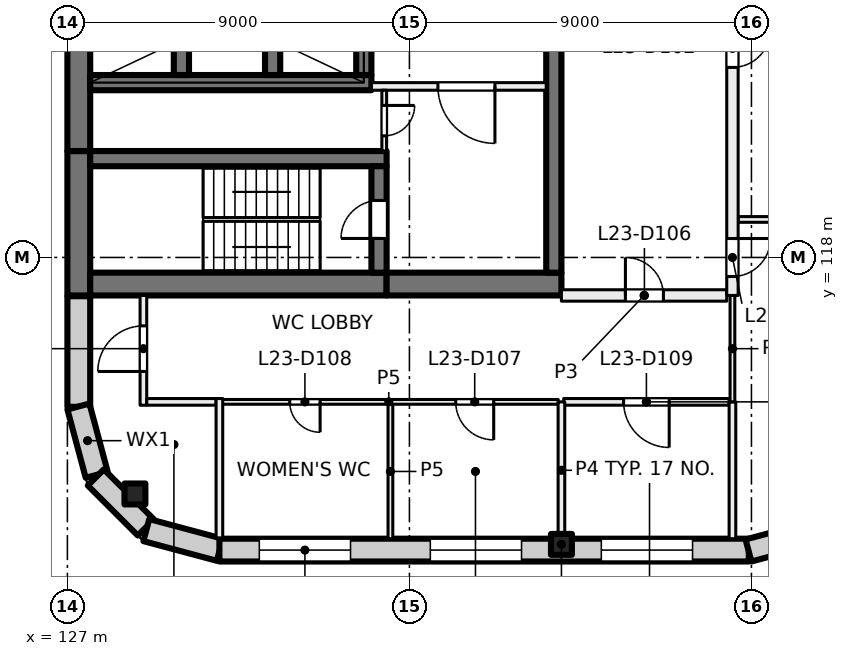
"""IFC4 building model, lengths in metres.
Left out: names, types, materials, properties, quantities, classifications, styles, units other than length and angle.
Written with IfcOpenShell. Run it as: python <this file> out.ifc"""

import sys

from ifc_helpers import new_model, si_unit, direction, frame, frame_2d, origin, origin_2d, place, context, subcontext, project, spatial, rectangle, extrude, element, fill, save


model = new_model("IFC4")
c1 = context("Model", 3, precision=1e-05, world=origin(), true_north=direction((0.0, 1.0)))
c2 = subcontext(c1, "Body", "Model", "MODEL_VIEW")
j1 = project(units=[si_unit("LENGTHUNIT", "METRE"), si_unit("PLANEANGLEUNIT", "RADIAN")], contexts=[c1])
p1 = place(None, origin())
s1 = spatial("IfcSite", under=j1, at=p1, CompositionType="ELEMENT")
p2 = place(p1, origin())
s2 = spatial("IfcBuilding", under=s1, at=p2, CompositionType="ELEMENT")
p3 = place(p2, frame((0.0, 0.0, 101.0)))
s3 = spatial("IfcBuildingStorey", under=s2, at=p3, CompositionType="ELEMENT", Elevation=101.0)
for number, where, z_axis, x_axis in (
    (1, (128.777, 111.777, 0.0), (0.0, 0.0, 1.0), (1.0, 0.0, 0.0)),
    (2, (140.0, 110.45, 0.0), (0.0, 0.0, 1.0), (1.0, 0.0, 0.0)),
):
    element("IfcColumn", number, at=place(p3, frame(where, z_axis=z_axis, x_axis=x_axis)), inside=s3, PredefinedType="COLUMN", context=c2, shape_type="SweptSolid", body=[
        extrude(rectangle(XDim=0.55, YDim=0.55, at=origin_2d()), origin(), (0.0, 0.0, 1.0), 4.0),
    ])
p4 = place(p3, frame((127.3, 117.0, 0.0), z_axis=(0.0, 0.0, 1.0), x_axis=(0.0, 1.0, 0.0)))
e3 = element("IfcWall", 3, at=p4, inside=s3, PredefinedType="SHEAR", context=c2, shape_type="SweptSolid", body=[
    extrude(rectangle(XDim=3.8, YDim=0.6, at=frame_2d((1.9, 0.0))), origin(), (0.0, 0.0, 1.0), 4.0),
])
p5 = place(p3, frame((127.3, 120.8, 0.0), z_axis=(0.0, 0.0, 1.0), x_axis=(0.0, 1.0, 0.0)))
e4 = element("IfcWall", 4, at=p5, inside=s3, PredefinedType="SHEAR", context=c2, shape_type="SweptSolid", body=[
    extrude(rectangle(XDim=14.4, YDim=0.6, at=frame_2d((7.2, 0.0))), origin(), (0.0, 0.0, 1.0), 4.0),
])
p6 = place(p3, frame((127.6, 117.3, 0.0), z_axis=(0.0, 0.0, 1.0), x_axis=(1.0, 0.0, 0.0)))
e5 = element("IfcWall", 5, at=p6, inside=s3, PredefinedType="SHEAR", context=c2, shape_type="SweptSolid", body=[
    extrude(rectangle(XDim=7.8, YDim=0.6, at=frame_2d((3.9, 0.0))), origin(), (0.0, 0.0, 1.0), 4.0),
])
p7 = place(p3, frame((135.4, 117.3, 0.0), z_axis=(0.0, 0.0, 1.0), x_axis=(1.0, 0.0, 0.0)))
e6 = element("IfcWall", 6, at=p7, inside=s3, PredefinedType="SHEAR", context=c2, shape_type="SweptSolid", body=[
    extrude(rectangle(XDim=4.6, YDim=0.6, at=frame_2d((2.3, 0.0))), origin(), (0.0, 0.0, 1.0), 4.0),
])
p8 = place(p3, frame((127.6, 120.6, 0.0), z_axis=(0.0, 0.0, 1.0), x_axis=(1.0, 0.0, 0.0)))
e7 = element("IfcWall", 7, at=p8, inside=s3, PredefinedType="SHEAR", context=c2, shape_type="SweptSolid", body=[
    extrude(rectangle(XDim=7.8, YDim=0.4, at=frame_2d((3.9, 0.0))), origin(), (0.0, 0.0, 1.0), 4.0),
])
p9 = place(p3, frame((135.2, 117.6, 0.0), z_axis=(0.0, 0.0, 1.0), x_axis=(0.0, 1.0, 0.0)))
e8 = element("IfcWall", 8, at=p9, inside=s3, PredefinedType="SHEAR", context=c2, shape_type="SweptSolid", body=[
    extrude(rectangle(XDim=2.8, YDim=0.4, at=frame_2d((1.4, 0.0))), origin(), (0.0, 0.0, 1.0), 4.0),
])
p10 = place(p9, frame((0.9, 0.0, 0.0)))
e9 = element("IfcOpeningElement", 9, at=p10, cuts=e8, PredefinedType="OPENING", context=c2, shape_type="SweptSolid", body=[
    extrude(rectangle(XDim=1.0, YDim=2.1, at=frame_2d((0.5, 1.05))), frame((0.0, 0.21, 0.0), z_axis=(0.0, -1.0, 0.0), x_axis=(1.0, 0.0, 0.0)), (0.0, 0.0, 1.0), 0.42),
])
p11 = place(p3, frame((127.6, 122.6, 0.0), z_axis=(0.0, 0.0, 1.0), x_axis=(1.0, 0.0, 0.0)))
e10 = element("IfcWall", 10, at=p11, inside=s3, PredefinedType="SHEAR", context=c2, shape_type="SweptSolid", body=[
    extrude(rectangle(XDim=7.4, YDim=0.4, at=frame_2d((3.7, 0.0))), origin(), (0.0, 0.0, 1.0), 4.0),
])
for number, where, z_axis, x_axis in (
    (11, (130.0, 122.8, 0.0), (0.0, 0.0, 1.0), (0.0, 1.0, 0.0)),
    (12, (132.4, 122.8, 0.0), (0.0, 0.0, 1.0), (0.0, 1.0, 0.0)),
    (13, (134.8, 122.8, 0.0), (0.0, 0.0, 1.0), (0.0, 1.0, 0.0)),
):
    element("IfcWall", number, at=place(p3, frame(where, z_axis=z_axis, x_axis=x_axis)), inside=s3, PredefinedType="SHEAR", context=c2, shape_type="SweptSolid", body=[
        extrude(rectangle(XDim=3.0, YDim=0.4, at=frame_2d((1.5, 0.0))), origin(), (0.0, 0.0, 1.0), 4.0),
    ])
p12 = place(p3, frame((139.8, 117.6, 0.0), z_axis=(0.0, 0.0, 1.0), x_axis=(0.0, 1.0, 0.0)))
e14 = element("IfcWall", 14, at=p12, inside=s3, PredefinedType="SHEAR", context=c2, shape_type="SweptSolid", body=[
    extrude(rectangle(XDim=8.6, YDim=0.4, at=frame_2d((4.3, 0.0))), origin(), (0.0, 0.0, 1.0), 4.0),
])
p13 = place(p3, frame((127.3, 114.07, 0.0), z_axis=(0.0, 0.0, 1.0), x_axis=(0.0, 1.0, 0.0)))
e15 = element("IfcWall", 15, at=p13, inside=s3, PredefinedType="SOLIDWALL", context=c2, shape_type="SweptSolid", body=[
    extrude(rectangle(XDim=2.91, YDim=0.6, at=frame_2d((1.455, 0.0))), origin(), (0.0, 0.0, 1.0), 3.625),
])
for number, where, z_axis, x_axis in (
    (16, (127.771, 112.281, 0.0), (0.0, 0.0, 1.0), (-0.259, 0.966, 0.0)),
    (17, (129.064, 110.896, 0.0), (0.0, 0.0, 1.0), (-0.707, 0.707, 0.0)),
):
    element("IfcWall", number, at=place(p3, frame(where, z_axis=z_axis, x_axis=x_axis)), inside=s3, PredefinedType="SOLIDWALL", context=c2, shape_type="SweptSolid", body=[
        extrude(rectangle(XDim=1.861, YDim=0.6, at=frame_2d((0.93, 0.0))), origin(), (0.0, 0.0, 1.0), 3.625),
    ])
p14 = place(p3, frame((131.01, 110.308, 0.0), z_axis=(0.0, 0.0, 1.0), x_axis=(-0.965920269068, 0.258839784042, 0.0)))
e18 = element("IfcWall", 18, at=p14, inside=s3, PredefinedType="SOLIDWALL", context=c2, shape_type="SweptSolid", body=[
    extrude(rectangle(XDim=2.0, YDim=0.6, at=frame_2d((1.0, 0.0))), origin(), (0.0, 0.0, 1.0), 3.625),
])
p15 = place(p3, frame((144.93, 110.3, 0.0), z_axis=(0.0, 0.0, 1.0), x_axis=(-1.0, 0.0, 0.0)))
e19 = element("IfcWall", 19, at=p15, inside=s3, PredefinedType="SOLIDWALL", context=c2, shape_type="SweptSolid", body=[
    extrude(rectangle(XDim=13.93, YDim=0.6, at=frame_2d((6.965, 0.0))), origin(), (0.0, 0.0, 1.0), 3.625),
])
p16 = place(p15, frame((1.48, 0.0, 0.9)))
e20 = element("IfcOpeningElement", 20, at=p16, cuts=e19, PredefinedType="OPENING", context=c2, shape_type="SweptSolid", body=[
    extrude(rectangle(XDim=2.4, YDim=2.4, at=frame_2d((1.2, 1.2))), frame((0.0, 0.31, 0.0), z_axis=(0.0, -1.0, 0.0), x_axis=(1.0, 0.0, 0.0)), (0.0, 0.0, 1.0), 0.62),
])
p17 = place(p15, frame((5.98, 0.0, 0.9)))
e21 = element("IfcOpeningElement", 21, at=p17, cuts=e19, PredefinedType="OPENING", context=c2, shape_type="SweptSolid", body=[
    extrude(rectangle(XDim=2.4, YDim=2.4, at=frame_2d((1.2, 1.2))), frame((0.0, 0.31, 0.0), z_axis=(0.0, -1.0, 0.0), x_axis=(1.0, 0.0, 0.0)), (0.0, 0.0, 1.0), 0.62),
])
p18 = place(p15, frame((10.48, 0.0, 0.9)))
e22 = element("IfcOpeningElement", 22, at=p18, cuts=e19, PredefinedType="OPENING", context=c2, shape_type="SweptSolid", body=[
    extrude(rectangle(XDim=2.4, YDim=2.4, at=frame_2d((1.2, 1.2))), frame((0.0, 0.31, 0.0), z_axis=(0.0, -1.0, 0.0), x_axis=(1.0, 0.0, 0.0)), (0.0, 0.0, 1.0), 0.62),
])
p19 = place(p3, frame((146.719, 110.771, 0.0), z_axis=(0.0, 0.0, 1.0), x_axis=(-0.965938094805, -0.258773254036, 0.0)))
e23 = element("IfcWall", 23, at=p19, inside=s3, PredefinedType="SOLIDWALL", context=c2, shape_type="SweptSolid", body=[
    extrude(rectangle(XDim=1.861, YDim=0.6, at=frame_2d((0.93, 0.0))), origin(), (0.0, 0.0, 1.0), 3.625),
])
p20 = place(p3, frame((139.6, 122.5, 0.0), z_axis=(0.0, 0.0, 1.0), x_axis=(-1.0, 0.0, 0.0)))
e24 = element("IfcWall", 24, at=p20, inside=s3, PredefinedType="PARTITIONING", context=c2, shape_type="SweptSolid", body=[
    extrude(rectangle(XDim=4.6, YDim=0.2, at=frame_2d((2.3, 0.0))), origin(), (0.0, 0.0, 1.0), 3.625),
])
p21 = place(p20, frame((1.35, 0.0, 0.0)))
e25 = element("IfcOpeningElement", 25, at=p21, cuts=e24, PredefinedType="OPENING", context=c2, shape_type="SweptSolid", body=[
    extrude(rectangle(XDim=1.5, YDim=2.1, at=frame_2d((0.75, 1.05))), frame((0.0, 0.11, 0.0), z_axis=(0.0, -1.0, 0.0), x_axis=(1.0, 0.0, 0.0)), (0.0, 0.0, 1.0), 0.22),
])
p22 = place(p3, frame((135.337, 122.4, 0.0), z_axis=(0.0, 0.0, 1.0), x_axis=(0.0, -1.0, 0.0)))
e26 = element("IfcWall", 26, at=p22, inside=s3, PredefinedType="PARTITIONING", context=c2, shape_type="SweptSolid", body=[
    extrude(rectangle(XDim=1.6, YDim=0.125, at=frame_2d((0.8, 0.0))), origin(), (0.0, 0.0, 1.0), 3.625),
])
p23 = place(p22, frame((0.4, 0.0, 0.0)))
e27 = element("IfcOpeningElement", 27, at=p23, cuts=e26, PredefinedType="OPENING", context=c2, shape_type="SweptSolid", body=[
    extrude(rectangle(XDim=0.8, YDim=2.1, at=frame_2d((0.4, 1.05))), frame((0.0, 0.073, 0.0), z_axis=(0.0, -1.0, 0.0), x_axis=(1.0, 0.0, 0.0)), (0.0, 0.0, 1.0), 0.145),
])
p24 = place(p3, frame((129.0, 114.112, 0.0), z_axis=(0.0, 0.0, 1.0), x_axis=(0.0, 1.0, 0.0)))
e28 = element("IfcWall", 28, at=p24, inside=s3, PredefinedType="PARTITIONING", context=c2, shape_type="SweptSolid", body=[
    extrude(rectangle(XDim=2.888, YDim=0.175, at=frame_2d((1.444, 0.0))), origin(), (0.0, 0.0, 1.0), 3.625),
])
p25 = place(p24, frame((0.888, 0.0, 0.0)))
e29 = element("IfcOpeningElement", 29, at=p25, cuts=e28, PredefinedType="OPENING", context=c2, shape_type="SweptSolid", body=[
    extrude(rectangle(XDim=1.2, YDim=2.1, at=frame_2d((0.6, 1.05))), frame((0.0, 0.097, 0.0), z_axis=(0.0, -1.0, 0.0), x_axis=(1.0, 0.0, 0.0)), (0.0, 0.0, 1.0), 0.195),
])
p26 = place(p3, frame((130.912, 114.2, 0.0), z_axis=(0.0, 0.0, 1.0), x_axis=(-1.0, 0.0, 0.0)))
e30 = element("IfcWall", 30, at=p26, inside=s3, PredefinedType="PARTITIONING", context=c2, shape_type="SweptSolid", body=[
    extrude(rectangle(XDim=1.824, YDim=0.175, at=frame_2d((0.912, 0.0))), origin(), (0.0, 0.0, 1.0), 3.625),
])
p27 = place(p3, frame((139.916, 114.2, 0.0), z_axis=(0.0, 0.0, 1.0), x_axis=(-1.0, 0.0, 0.0)))
e31 = element("IfcWall", 31, at=p27, inside=s3, PredefinedType="PARTITIONING", context=c2, shape_type="SweptSolid", body=[
    extrude(rectangle(XDim=8.919, YDim=0.125, at=frame_2d((4.459, 0.0))), origin(), (0.0, 0.0, 1.0), 3.625),
])
p28 = place(p27, frame((1.698, 0.0, 0.0)))
e32 = element("IfcOpeningElement", 32, at=p28, cuts=e31, PredefinedType="OPENING", context=c2, shape_type="SweptSolid", body=[
    extrude(rectangle(XDim=1.0, YDim=2.1, at=frame_2d((0.5, 1.05))), frame((0.0, 0.073, 0.0), z_axis=(0.0, -1.0, 0.0), x_axis=(1.0, 0.0, 0.0)), (0.0, 0.0, 1.0), 0.145),
])
p29 = place(p27, frame((6.266, 0.0, 0.0)))
e33 = element("IfcOpeningElement", 33, at=p29, cuts=e31, PredefinedType="OPENING", context=c2, shape_type="SweptSolid", body=[
    extrude(rectangle(XDim=0.8, YDim=2.1, at=frame_2d((0.4, 1.05))), frame((0.0, 0.073, 0.0), z_axis=(0.0, -1.0, 0.0), x_axis=(1.0, 0.0, 0.0)), (0.0, 0.0, 1.0), 0.145),
])
p30 = place(p3, frame((131.0, 114.288, 0.0), z_axis=(0.0, 0.0, 1.0), x_axis=(0.0, -1.0, 0.0)))
e34 = element("IfcWall", 34, at=p30, inside=s3, PredefinedType="PARTITIONING", context=c2, shape_type="SweptSolid", body=[
    extrude(rectangle(XDim=3.667, YDim=0.175, at=frame_2d((1.833, 0.0))), origin(), (0.0, 0.0, 1.0), 3.625),
])
p31 = place(p3, frame((135.5, 110.6, 0.0), z_axis=(0.0, 0.0, 1.0), x_axis=(0.0, 1.0, 0.0)))
e35 = element("IfcWall", 35, at=p31, inside=s3, PredefinedType="PARTITIONING", context=c2, shape_type="SweptSolid", body=[
    extrude(rectangle(XDim=3.538, YDim=0.125, at=frame_2d((1.769, 0.0))), origin(), (0.0, 0.0, 1.0), 3.625),
])
p32 = place(p3, frame((144.412, 114.2, 0.0), z_axis=(0.0, 0.0, 1.0), x_axis=(-1.0, 0.0, 0.0)))
e36 = element("IfcWall", 36, at=p32, inside=s3, PredefinedType="PARTITIONING", context=c2, shape_type="SweptSolid", body=[
    extrude(rectangle(XDim=4.352, YDim=0.175, at=frame_2d((2.176, 0.0))), origin(), (0.0, 0.0, 1.0), 3.625),
])
p33 = place(p32, frame((1.576, 0.0, 0.0)))
e37 = element("IfcOpeningElement", 37, at=p33, cuts=e36, PredefinedType="OPENING", context=c2, shape_type="SweptSolid", body=[
    extrude(rectangle(XDim=1.2, YDim=2.1, at=frame_2d((0.6, 1.05))), frame((0.0, 0.097, 0.0), z_axis=(0.0, -1.0, 0.0), x_axis=(1.0, 0.0, 0.0)), (0.0, 0.0, 1.0), 0.195),
])
for number, where, z_axis, x_axis in (
    (38, (140.0, 110.6, 0.0), (0.0, 0.0, 1.0), (0.0, 1.0, 0.0)),
    (39, (144.5, 114.2, 0.0), (0.0, 0.0, 1.0), (0.0, -1.0, 0.0)),
):
    element("IfcWall", number, at=place(p3, frame(where, z_axis=z_axis, x_axis=x_axis)), inside=s3, PredefinedType="PARTITIONING", context=c2, shape_type="SweptSolid", body=[
        extrude(rectangle(XDim=3.6, YDim=0.175, at=frame_2d((1.8, 0.0))), origin(), (0.0, 0.0, 1.0), 3.625),
    ])
p34 = place(p3, frame((140.0, 117.0, 0.0), z_axis=(0.0, 0.0, 1.0), x_axis=(1.0, 0.0, 0.0)))
e40 = element("IfcWall", 40, at=p34, inside=s3, PredefinedType="PARTITIONING", context=c2, shape_type="SweptSolid", body=[
    extrude(rectangle(XDim=4.35, YDim=0.3, at=frame_2d((2.175, 0.0))), origin(), (0.0, 0.0, 1.0), 3.625),
])
p35 = place(p34, frame((1.684, 0.0, 0.0)))
e41 = element("IfcOpeningElement", 41, at=p35, cuts=e40, PredefinedType="OPENING", context=c2, shape_type="SweptSolid", body=[
    extrude(rectangle(XDim=1.0, YDim=2.1, at=frame_2d((0.5, 1.05))), frame((0.0, 0.16, 0.0), z_axis=(0.0, -1.0, 0.0), x_axis=(1.0, 0.0, 0.0)), (0.0, 0.0, 1.0), 0.32),
])
p36 = place(p3, frame((144.5, 117.0, 0.0), z_axis=(0.0, 0.0, 1.0), x_axis=(0.0, -1.0, 0.0)))
e42 = element("IfcWall", 42, at=p36, inside=s3, PredefinedType="PARTITIONING", context=c2, shape_type="SweptSolid", body=[
    extrude(rectangle(XDim=2.8, YDim=0.125, at=frame_2d((1.4, 0.0))), origin(), (0.0, 0.0, 1.0), 3.625),
])
p37 = place(p3, frame((144.65, 119.0, 0.0), z_axis=(0.0, 0.0, 1.0), x_axis=(1.0, 0.0, 0.0)))
e43 = element("IfcWall", 43, at=p37, inside=s3, PredefinedType="PARTITIONING", context=c2, shape_type="SweptSolid", body=[
    extrude(rectangle(XDim=3.75, YDim=0.15, at=frame_2d((1.875, 0.0))), origin(), (0.0, 0.0, 1.0), 3.625),
])
p38 = place(p3, frame((144.5, 139.0, 0.0), z_axis=(0.0, 0.0, 1.0), x_axis=(0.0, -1.0, 0.0)))
e44 = element("IfcWall", 44, at=p38, inside=s3, PredefinedType="PARTITIONING", context=c2, shape_type="SweptSolid", body=[
    extrude(rectangle(XDim=22.0, YDim=0.3, at=frame_2d((11.0, 0.0))), origin(), (0.0, 0.0, 1.0), 3.625),
])
p39 = place(p38, frame((20.501, 0.0, 0.0)))
e45 = element("IfcOpeningElement", 45, at=p39, cuts=e44, PredefinedType="OPENING", context=c2, shape_type="SweptSolid", body=[
    extrude(rectangle(XDim=1.0, YDim=2.1, at=frame_2d((0.5, 1.05))), frame((0.0, 0.16, 0.0), z_axis=(0.0, -1.0, 0.0), x_axis=(1.0, 0.0, 0.0)), (0.0, 0.0, 1.0), 0.32),
])
p40 = place(p38, frame((15.0, 0.0, 0.0)))
e46 = element("IfcOpeningElement", 46, at=p40, cuts=e44, PredefinedType="OPENING", context=c2, shape_type="SweptSolid", body=[
    extrude(rectangle(XDim=1.0, YDim=2.1, at=frame_2d((0.5, 1.05))), frame((0.0, 0.16, 0.0), z_axis=(0.0, -1.0, 0.0), x_axis=(1.0, 0.0, 0.0)), (0.0, 0.0, 1.0), 0.32),
])
p41 = place(p38, frame((6.0, 0.0, 0.0)))
e47 = element("IfcOpeningElement", 47, at=p41, cuts=e44, PredefinedType="OPENING", context=c2, shape_type="SweptSolid", body=[
    extrude(rectangle(XDim=1.0, YDim=2.1, at=frame_2d((0.5, 1.05))), frame((0.0, 0.16, 0.0), z_axis=(0.0, -1.0, 0.0), x_axis=(1.0, 0.0, 0.0)), (0.0, 0.0, 1.0), 0.32),
])
p42 = place(p38, frame((0.398, 0.0, 0.0)))
e48 = element("IfcOpeningElement", 48, at=p42, cuts=e44, PredefinedType="OPENING", context=c2, shape_type="SweptSolid", body=[
    extrude(rectangle(XDim=1.2, YDim=2.1, at=frame_2d((0.6, 1.05))), frame((0.0, 0.16, 0.0), z_axis=(0.0, -1.0, 0.0), x_axis=(1.0, 0.0, 0.0)), (0.0, 0.0, 1.0), 0.32),
])
p43 = place(p16, origin())
e49 = element("IfcWindow", 49, at=p43, inside=s3, PartitioningType="SINGLE_PANEL", PredefinedType="WINDOW", context=c2, shape_type="SweptSolid", body=[
    extrude(rectangle(XDim=2.4, YDim=2.4, at=frame_2d((1.2, 1.2))), frame((0.0, 0.03, 0.0), z_axis=(0.0, -1.0, 0.0), x_axis=(1.0, 0.0, 0.0)), (0.0, 0.0, 1.0), 0.06),
])
fill(e20, e49)
p44 = place(p17, origin())
e50 = element("IfcWindow", 50, at=p44, inside=s3, PartitioningType="SINGLE_PANEL", PredefinedType="WINDOW", context=c2, shape_type="SweptSolid", body=[
    extrude(rectangle(XDim=2.4, YDim=2.4, at=frame_2d((1.2, 1.2))), frame((0.0, 0.03, 0.0), z_axis=(0.0, -1.0, 0.0), x_axis=(1.0, 0.0, 0.0)), (0.0, 0.0, 1.0), 0.06),
])
fill(e21, e50)
p45 = place(p18, origin())
e51 = element("IfcWindow", 51, at=p45, inside=s3, PartitioningType="SINGLE_PANEL", PredefinedType="WINDOW", context=c2, shape_type="SweptSolid", body=[
    extrude(rectangle(XDim=2.4, YDim=2.4, at=frame_2d((1.2, 1.2))), frame((0.0, 0.03, 0.0), z_axis=(0.0, -1.0, 0.0), x_axis=(1.0, 0.0, 0.0)), (0.0, 0.0, 1.0), 0.06),
])
fill(e22, e51)
p46 = place(p21, origin())
e52 = element("IfcDoor", 52, at=p46, inside=s3, OperationType="DOUBLE_DOOR_SINGLE_SWING", PredefinedType="DOOR", context=c2, shape_type="SweptSolid", body=[
    extrude(rectangle(XDim=1.5, YDim=2.1, at=frame_2d((0.75, 1.05))), frame((0.0, 0.025, 0.0), z_axis=(0.0, -1.0, 0.0), x_axis=(1.0, 0.0, 0.0)), (0.0, 0.0, 1.0), 0.05),
])
fill(e25, e52)
p47 = place(p10, origin())
e53 = element("IfcDoor", 53, at=p47, inside=s3, OperationType="SINGLE_SWING_RIGHT", PredefinedType="DOOR", context=c2, shape_type="SweptSolid", body=[
    extrude(rectangle(XDim=1.0, YDim=2.1, at=frame_2d((0.5, 1.05))), frame((0.0, 0.025, 0.0), z_axis=(0.0, -1.0, 0.0), x_axis=(1.0, 0.0, 0.0)), (0.0, 0.0, 1.0), 0.05),
])
fill(e9, e53)
p48 = place(p23, origin())
e54 = element("IfcDoor", 54, at=p48, inside=s3, OperationType="SINGLE_SWING_LEFT", PredefinedType="DOOR", context=c2, shape_type="SweptSolid", body=[
    extrude(rectangle(XDim=0.8, YDim=2.1, at=frame_2d((0.4, 1.05))), frame((0.0, 0.025, 0.0), z_axis=(0.0, -1.0, 0.0), x_axis=(1.0, 0.0, 0.0)), (0.0, 0.0, 1.0), 0.05),
])
fill(e27, e54)
p49 = place(p39, origin())
e55 = element("IfcDoor", 55, at=p49, inside=s3, OperationType="SINGLE_SWING_LEFT", PredefinedType="DOOR", context=c2, shape_type="SweptSolid", body=[
    extrude(rectangle(XDim=1.0, YDim=2.1, at=frame_2d((0.5, 1.05))), frame((0.0, 0.025, 0.0), z_axis=(0.0, -1.0, 0.0), x_axis=(1.0, 0.0, 0.0)), (0.0, 0.0, 1.0), 0.05),
])
fill(e45, e55)
p50 = place(p40, origin())
e56 = element("IfcDoor", 56, at=p50, inside=s3, OperationType="SINGLE_SWING_LEFT", PredefinedType="DOOR", context=c2, shape_type="SweptSolid", body=[
    extrude(rectangle(XDim=1.0, YDim=2.1, at=frame_2d((0.5, 1.05))), frame((0.0, 0.025, 0.0), z_axis=(0.0, -1.0, 0.0), x_axis=(1.0, 0.0, 0.0)), (0.0, 0.0, 1.0), 0.05),
])
fill(e46, e56)
p51 = place(p35, origin())
e57 = element("IfcDoor", 57, at=p51, inside=s3, OperationType="SINGLE_SWING_LEFT", PredefinedType="DOOR", context=c2, shape_type="SweptSolid", body=[
    extrude(rectangle(XDim=1.0, YDim=2.1, at=frame_2d((0.5, 1.05))), frame((0.0, 0.025, 0.0), z_axis=(0.0, -1.0, 0.0), x_axis=(1.0, 0.0, 0.0)), (0.0, 0.0, 1.0), 0.05),
])
fill(e41, e57)
p52 = place(p28, origin())
e58 = element("IfcDoor", 58, at=p52, inside=s3, OperationType="SINGLE_SWING_LEFT", PredefinedType="DOOR", context=c2, shape_type="SweptSolid", body=[
    extrude(rectangle(XDim=1.0, YDim=2.1, at=frame_2d((0.5, 1.05))), frame((0.0, 0.025, 0.0), z_axis=(0.0, -1.0, 0.0), x_axis=(1.0, 0.0, 0.0)), (0.0, 0.0, 1.0), 0.05),
])
fill(e32, e58)
p53 = place(p29, origin())
e59 = element("IfcDoor", 59, at=p53, inside=s3, OperationType="SINGLE_SWING_RIGHT", PredefinedType="DOOR", context=c2, shape_type="SweptSolid", body=[
    extrude(rectangle(XDim=0.8, YDim=2.1, at=frame_2d((0.4, 1.05))), frame((0.0, 0.025, 0.0), z_axis=(0.0, -1.0, 0.0), x_axis=(1.0, 0.0, 0.0)), (0.0, 0.0, 1.0), 0.05),
])
fill(e33, e59)
p54 = place(p33, origin())
e60 = element("IfcDoor", 60, at=p54, inside=s3, OperationType="DOUBLE_DOOR_SINGLE_SWING", PredefinedType="DOOR", context=c2, shape_type="SweptSolid", body=[
    extrude(rectangle(XDim=1.2, YDim=2.1, at=frame_2d((0.6, 1.05))), frame((0.0, 0.025, 0.0), z_axis=(0.0, -1.0, 0.0), x_axis=(1.0, 0.0, 0.0)), (0.0, 0.0, 1.0), 0.05),
])
fill(e37, e60)
p55 = place(p25, origin())
e61 = element("IfcDoor", 61, at=p55, inside=s3, OperationType="DOUBLE_DOOR_SINGLE_SWING", PredefinedType="DOOR", context=c2, shape_type="SweptSolid", body=[
    extrude(rectangle(XDim=1.2, YDim=2.1, at=frame_2d((0.6, 1.05))), frame((0.0, 0.025, 0.0), z_axis=(0.0, -1.0, 0.0), x_axis=(1.0, 0.0, 0.0)), (0.0, 0.0, 1.0), 0.05),
])
fill(e29, e61)
save(model, sys.argv[1])
